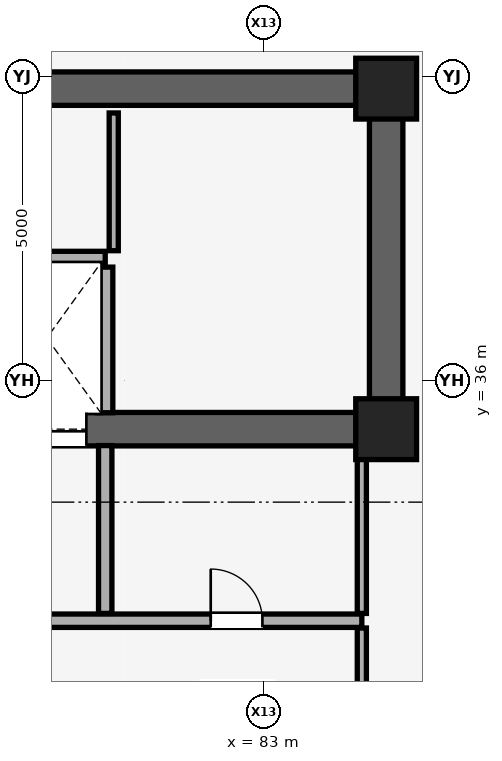
"""IFC4 building model, lengths in metres.
Left out: names, types, materials, properties, quantities, classifications, styles, units other than length and angle.
Written with IfcOpenShell. Run it as: python <this file> out.ifc"""

import sys

from ifc_helpers import new_model, si_unit, direction, frame, frame_2d, origin, origin_2d, place, context, subcontext, project, spatial, rectangle, extrude, element, fill, save


model = new_model("IFC4")
c1 = context("Model", 3, precision=1e-05, world=origin(), true_north=direction((0.0, 1.0)))
c2 = subcontext(c1, "Body", "Model", "MODEL_VIEW")
j1 = project(units=[si_unit("LENGTHUNIT", "METRE"), si_unit("PLANEANGLEUNIT", "RADIAN")], contexts=[c1])
p1 = place(None, origin())
s1 = spatial("IfcSite", under=j1, at=p1, CompositionType="ELEMENT")
p2 = place(p1, origin())
s2 = spatial("IfcBuilding", under=s1, at=p2, CompositionType="ELEMENT")
p3 = place(p2, frame((0.0, 0.0, 147.8)))
s3 = spatial("IfcBuildingStorey", under=s2, at=p3, CompositionType="ELEMENT", Elevation=147.8)
for number, where, z_axis, x_axis in (
    (1, (85.0, 35.2, 0.0), (0.0, 0.0, 1.0), (1.0, 0.0, 0.0)),
    (2, (85.0, 40.8, 0.0), (0.0, 0.0, 1.0), (1.0, 0.0, 0.0)),
):
    element("IfcColumn", number, at=place(p3, frame(where, z_axis=z_axis, x_axis=x_axis)), inside=s3, PredefinedType="COLUMN", context=c2, shape_type="SweptSolid", body=[
        extrude(rectangle(XDim=1.0, YDim=1.0, at=origin_2d()), origin(), (0.0, 0.0, 1.0), 6.6),
    ])
p4 = place(p3, frame((68.0, 40.8, 0.0), z_axis=(0.0, 0.0, 1.0), x_axis=(1.0, 0.0, 0.0)))
e3 = element("IfcWall", 3, at=p4, inside=s3, PredefinedType="SHEAR", context=c2, shape_type="SweptSolid", body=[
    extrude(rectangle(XDim=17.0, YDim=0.55, at=frame_2d((8.5, 0.0))), origin(), (0.0, 0.0, 1.0), 6.4),
])
p5 = place(p3, frame((85.0, 35.2, 0.0), z_axis=(0.0, 0.0, 1.0), x_axis=(0.0, 1.0, 0.0)))
e4 = element("IfcWall", 4, at=p5, inside=s3, PredefinedType="SHEAR", context=c2, shape_type="SweptSolid", body=[
    extrude(rectangle(XDim=5.6, YDim=0.55, at=frame_2d((2.8, 0.0))), origin(), (0.0, 0.0, 1.0), 6.4),
])
p6 = place(p3, frame((68.0, 35.2, 0.0), z_axis=(0.0, 0.0, 1.0), x_axis=(1.0, 0.0, 0.0)))
e5 = element("IfcWall", 5, at=p6, inside=s3, PredefinedType="SHEAR", context=c2, shape_type="SweptSolid", body=[
    extrude(rectangle(XDim=17.0, YDim=0.55, at=frame_2d((8.5, 0.0))), origin(), (0.0, 0.0, 1.0), 6.4),
])
p7 = place(p6, frame((1.06, 0.0, 0.0)))
e6 = element("IfcOpeningElement", 6, at=p7, cuts=e5, PredefinedType="OPENING", context=c2, shape_type="SweptSolid", body=[
    extrude(rectangle(XDim=1.15, YDim=2.2, at=frame_2d((0.575, 1.1))), frame((0.0, 0.285, 0.0), z_axis=(0.0, -1.0, 0.0), x_axis=(1.0, 0.0, 0.0)), (0.0, 0.0, 1.0), 0.57),
])
p8 = place(p6, frame((8.75, 0.0, 0.0)))
e7 = element("IfcOpeningElement", 7, at=p8, cuts=e5, PredefinedType="OPENING", context=c2, shape_type="SweptSolid", body=[
    extrude(rectangle(XDim=1.4, YDim=2.35, at=frame_2d((0.7, 1.175))), frame((0.0, 0.285, 0.0), z_axis=(0.0, -1.0, 0.0), x_axis=(1.0, 0.0, 0.0)), (0.0, 0.0, 1.0), 0.57),
])
p9 = place(p6, frame((10.77, 0.0, 0.0)))
e8 = element("IfcOpeningElement", 8, at=p9, cuts=e5, PredefinedType="OPENING", context=c2, shape_type="SweptSolid", body=[
    extrude(rectangle(XDim=1.3, YDim=2.3, at=frame_2d((0.65, 1.15))), frame((0.0, 0.285, 0.0), z_axis=(0.0, -1.0, 0.0), x_axis=(1.0, 0.0, 0.0)), (0.0, 0.0, 1.0), 0.57),
])
p10 = place(p3, frame((72.84, 32.05, 0.0), z_axis=(0.0, 0.0, 1.0), x_axis=(1.0, 0.0, 0.0)))
e9 = element("IfcWall", 9, at=p10, inside=s3, PredefinedType="SOLIDWALL", context=c2, shape_type="SweptSolid", body=[
    extrude(rectangle(XDim=11.76, YDim=0.22, at=frame_2d((5.88, 0.0))), origin(), (0.0, 0.0, 1.0), 5.975),
])
p11 = place(p10, frame((4.6, 0.0, 0.0)))
e10 = element("IfcOpeningElement", 10, at=p11, cuts=e9, PredefinedType="OPENING", context=c2, shape_type="SweptSolid", body=[
    extrude(rectangle(XDim=1.2, YDim=2.25, at=frame_2d((0.6, 1.125))), frame((0.0, 0.12, 0.0), z_axis=(0.0, -1.0, 0.0), x_axis=(1.0, 0.0, 0.0)), (0.0, 0.0, 1.0), 0.24),
])
p12 = place(p10, frame((9.275, 0.0, 0.0)))
e11 = element("IfcOpeningElement", 11, at=p12, cuts=e9, PredefinedType="OPENING", context=c2, shape_type="SweptSolid", body=[
    extrude(rectangle(XDim=0.85, YDim=2.01, at=frame_2d((0.425, 1.005))), frame((0.0, 0.12, 0.0), z_axis=(0.0, -1.0, 0.0), x_axis=(1.0, 0.0, 0.0)), (0.0, 0.0, 1.0), 0.24),
])
p13 = place(p10, frame((0.9, 0.0, 0.0)))
e12 = element("IfcOpeningElement", 12, at=p13, cuts=e9, PredefinedType="OPENING", context=c2, shape_type="SweptSolid", body=[
    extrude(rectangle(XDim=0.85, YDim=2.01, at=frame_2d((0.425, 1.005))), frame((0.0, 0.12, 0.0), z_axis=(0.0, -1.0, 0.0), x_axis=(1.0, 0.0, 0.0)), (0.0, 0.0, 1.0), 0.24),
])
p14 = place(p3, frame((76.72, 38.0, 0.0), z_axis=(0.0, 0.0, 1.0), x_axis=(1.0, 0.0, 0.0)))
e13 = element("IfcWall", 13, at=p14, inside=s3, PredefinedType="SOLIDWALL", context=c2, shape_type="SweptSolid", body=[
    extrude(rectangle(XDim=3.66, YDim=0.25, at=frame_2d((1.83, 0.0))), origin(), (0.0, 0.0, 1.0), 6.4),
])
p15 = place(p3, frame((80.38, 32.17, 0.0), z_axis=(0.0, 0.0, 1.0), x_axis=(0.0, 1.0, 0.0)))
e14 = element("IfcWall", 14, at=p15, inside=s3, PredefinedType="SOLIDWALL", context=c2, shape_type="SweptSolid", body=[
    extrude(rectangle(XDim=2.76, YDim=0.22, at=frame_2d((1.38, 0.0))), origin(), (0.0, 0.0, 1.0), 6.4),
])
p16 = place(p3, frame((80.38, 35.47, 0.0), z_axis=(0.0, 0.0, 1.0), x_axis=(0.0, 1.0, 0.0)))
e15 = element("IfcWall", 15, at=p16, inside=s3, PredefinedType="SOLIDWALL", context=c2, shape_type="SweptSolid", body=[
    extrude(rectangle(XDim=2.395, YDim=0.25, at=frame_2d((1.198, 0.0))), origin(), (0.0, 0.0, 1.0), 6.4),
])
p17 = place(p3, frame((80.52, 38.135, 0.0), z_axis=(0.0, 0.0, 1.0), x_axis=(0.0, 1.0, 0.0)))
e16 = element("IfcWall", 16, at=p17, inside=s3, PredefinedType="PARTITIONING", context=c2, shape_type="SweptSolid", body=[
    extrude(rectangle(XDim=2.265, YDim=0.15, at=frame_2d((1.132, 0.0))), origin(), (0.0, 0.0, 1.0), 6.4),
])
p18 = place(p3, frame((84.6, 30.42, 0.0), z_axis=(0.0, 0.0, 1.0), x_axis=(0.0, 1.0, 0.0)))
e17 = element("IfcWall", 17, at=p18, inside=s3, PredefinedType="PARTITIONING", context=c2, shape_type="SweptSolid", body=[
    extrude(rectangle(XDim=1.51, YDim=0.15, at=frame_2d((0.755, 0.0))), origin(), (0.0, 0.0, 1.0), 6.4),
])
p19 = place(p3, frame((84.6, 32.17, 0.0), z_axis=(0.0, 0.0, 1.0), x_axis=(0.0, 1.0, 0.0)))
e18 = element("IfcWall", 18, at=p19, inside=s3, PredefinedType="PARTITIONING", context=c2, shape_type="SweptSolid", body=[
    extrude(rectangle(XDim=2.76, YDim=0.15, at=frame_2d((1.38, 0.0))), origin(), (0.0, 0.0, 1.0), 6.4),
])
p20 = place(p12, origin())
e19 = element("IfcDoor", 19, at=p20, inside=s3, OperationType="SINGLE_SWING_LEFT", PredefinedType="DOOR", context=c2, shape_type="SweptSolid", body=[
    extrude(rectangle(XDim=0.85, YDim=2.01, at=frame_2d((0.425, 1.005))), frame((0.0, 0.025, 0.0), z_axis=(0.0, -1.0, 0.0), x_axis=(1.0, 0.0, 0.0)), (0.0, 0.0, 1.0), 0.05),
])
fill(e11, e19)
p21 = place(p9, origin())
e20 = element("IfcDoor", 20, at=p21, inside=s3, OperationType="DOUBLE_DOOR_SLIDING", PredefinedType="DOOR", context=c2, shape_type="SweptSolid", body=[
    extrude(rectangle(XDim=1.3, YDim=2.3, at=frame_2d((0.65, 1.15))), frame((0.0, 0.025, 0.0), z_axis=(0.0, -1.0, 0.0), x_axis=(1.0, 0.0, 0.0)), (0.0, 0.0, 1.0), 0.05),
])
fill(e8, e20)
save(model, sys.argv[1])
